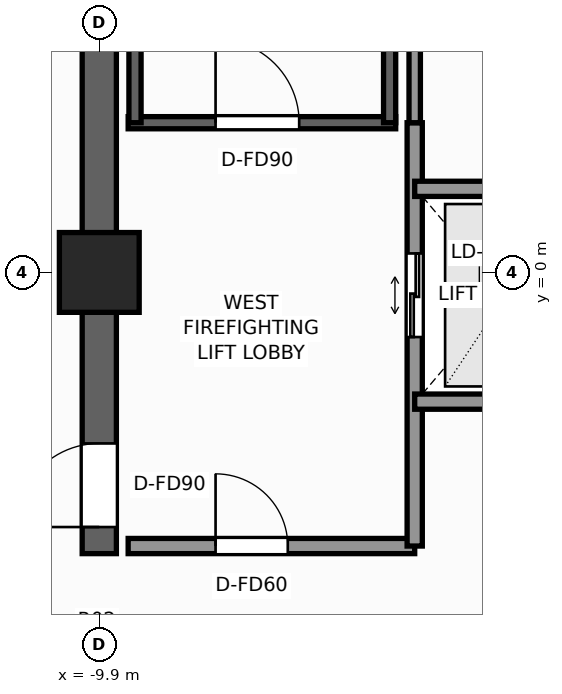
"""IFC4 building model, lengths in metres.
Left out: names, types, materials, properties, quantities, classifications, styles, units other than length and angle.
Written with IfcOpenShell. Run it as: python <this file> out.ifc"""

import sys

from ifc_helpers import new_model, si_unit, direction, frame, frame_2d, origin, origin_2d, place, context, subcontext, project, spatial, rectangle, extrude, element, fill, save


model = new_model("IFC4")
c1 = context("Model", 3, precision=1e-05, world=origin(), true_north=direction((0.0, 1.0)))
c2 = subcontext(c1, "Body", "Model", "MODEL_VIEW")
j1 = project(units=[si_unit("LENGTHUNIT", "METRE"), si_unit("PLANEANGLEUNIT", "RADIAN")], contexts=[c1])
p1 = place(None, origin())
s1 = spatial("IfcSite", under=j1, at=p1, CompositionType="ELEMENT")
p2 = place(p1, origin())
s2 = spatial("IfcBuilding", under=s1, at=p2, CompositionType="ELEMENT")
p3 = place(p2, frame((0.0, 0.0, 254.9)))
s3 = spatial("IfcBuildingStorey", under=s2, at=p3, CompositionType="ELEMENT", Elevation=254.9)
p4 = place(p3, frame((-9.9, -3.7, 0.0), z_axis=(0.0, 0.0, 1.0), x_axis=(0.0, 1.0, 0.0)))
e1 = element("IfcWall", 1, at=p4, inside=s3, PredefinedType="SHEAR", context=c2, shape_type="SweptSolid", body=[
    extrude(rectangle(XDim=13.375, YDim=0.45, at=frame_2d((6.688, 0.0))), origin(), (0.0, 0.0, 1.0), 3.5),
])
p5 = place(p4, frame((0.35, 0.0, 0.0)))
e2 = element("IfcOpeningElement", 2, at=p5, cuts=e1, PredefinedType="OPENING", context=c2, shape_type="SweptSolid", body=[
    extrude(rectangle(XDim=1.1, YDim=2.2, at=frame_2d((0.55, 1.1))), frame((0.0, 0.235, 0.0), z_axis=(0.0, -1.0, 0.0), x_axis=(1.0, 0.0, 0.0)), (0.0, 0.0, 1.0), 0.47),
])
p6 = place(p3, frame((-9.9, 0.0, 0.0), z_axis=(0.0, 0.0, 1.0), x_axis=(1.0, 0.0, 0.0)))
e3 = element("IfcColumn", 3, at=p6, inside=s3, PredefinedType="COLUMN", context=c2, shape_type="SweptSolid", body=[
    extrude(rectangle(XDim=1.05, YDim=1.05, at=origin_2d()), origin(), (0.0, 0.0, 1.0), 3.5),
])
p7 = place(p3, frame((-9.52, 1.97, 0.0), z_axis=(0.0, 0.0, 1.0), x_axis=(1.0, 0.0, 0.0)))
e4 = element("IfcWall", 4, at=p7, inside=s3, PredefinedType="SHEAR", context=c2, shape_type="SweptSolid", body=[
    extrude(rectangle(XDim=3.52, YDim=0.16, at=frame_2d((1.76, 0.0))), origin(), (0.0, 0.0, 1.0), 3.5),
])
p8 = place(p7, frame((1.15, 0.0, 0.0)))
e5 = element("IfcOpeningElement", 5, at=p8, cuts=e4, PredefinedType="OPENING", context=c2, shape_type="SweptSolid", body=[
    extrude(rectangle(XDim=1.1, YDim=2.2, at=frame_2d((0.55, 1.1))), frame((0.0, 0.09, 0.0), z_axis=(0.0, -1.0, 0.0), x_axis=(1.0, 0.0, 0.0)), (0.0, 0.0, 1.0), 0.18),
])
for number, where, z_axis, x_axis in (
    (6, (-9.43, 1.97, 0.0), (0.0, 0.0, 1.0), (0.0, 1.0, 0.0)),
    (7, (-6.08, 1.97, 0.0), (0.0, 0.0, 1.0), (0.0, 1.0, 0.0)),
):
    element("IfcWall", number, at=place(p3, frame(where, z_axis=z_axis, x_axis=x_axis)), inside=s3, PredefinedType="SHEAR", context=c2, shape_type="SweptSolid", body=[
        extrude(rectangle(XDim=7.56, YDim=0.16, at=frame_2d((3.78, 0.0))), origin(), (0.0, 0.0, 1.0), 3.5),
    ])
p9 = place(p3, frame((-9.52, -3.6, 0.0), z_axis=(0.0, 0.0, 1.0), x_axis=(1.0, 0.0, 0.0)))
e8 = element("IfcWall", 8, at=p9, inside=s3, PredefinedType="SOLIDWALL", context=c2, shape_type="SweptSolid", body=[
    extrude(rectangle(XDim=3.77, YDim=0.2, at=frame_2d((1.885, 0.0))), origin(), (0.0, 0.0, 1.0), 3.22),
])
p10 = place(p9, frame((1.15, 0.0, 0.0)))
e9 = element("IfcOpeningElement", 9, at=p10, cuts=e8, PredefinedType="OPENING", context=c2, shape_type="SweptSolid", body=[
    extrude(rectangle(XDim=0.95, YDim=2.06, at=frame_2d((0.475, 1.03))), frame((0.0, 0.11, 0.0), z_axis=(0.0, -1.0, 0.0), x_axis=(1.0, 0.0, 0.0)), (0.0, 0.0, 1.0), 0.22),
])
p11 = place(p3, frame((-5.75, -3.6, 0.0), z_axis=(0.0, 0.0, 1.0), x_axis=(0.0, 1.0, 0.0)))
e10 = element("IfcWall", 10, at=p11, inside=s3, PredefinedType="SOLIDWALL", context=c2, shape_type="SweptSolid", body=[
    extrude(rectangle(XDim=5.57, YDim=0.2, at=frame_2d((2.785, 0.0))), origin(), (0.0, 0.0, 1.0), 3.22),
])
p12 = place(p11, frame((2.75, 0.0, 0.0)))
e11 = element("IfcOpeningElement", 11, at=p12, cuts=e10, PredefinedType="OPENING", context=c2, shape_type="SweptSolid", body=[
    extrude(rectangle(XDim=1.1, YDim=2.2, at=frame_2d((0.55, 1.1))), frame((0.0, 0.11, 0.0), z_axis=(0.0, -1.0, 0.0), x_axis=(1.0, 0.0, 0.0)), (0.0, 0.0, 1.0), 0.22),
])
for number, where, z_axis, x_axis in (
    (12, (-5.75, -1.7, 0.0), (0.0, 0.0, 1.0), (1.0, 0.0, 0.0)),
    (13, (-5.75, 1.1, 0.0), (0.0, 0.0, 1.0), (1.0, 0.0, 0.0)),
):
    element("IfcWall", number, at=place(p3, frame(where, z_axis=z_axis, x_axis=x_axis)), inside=s3, PredefinedType="SOLIDWALL", context=c2, shape_type="SweptSolid", body=[
        extrude(rectangle(XDim=2.4, YDim=0.2, at=frame_2d((1.2, 0.0))), origin(), (0.0, 0.0, 1.0), 3.22),
    ])
p13 = place(p3, frame((-5.75, 1.97, 0.0), z_axis=(0.0, 0.0, 1.0), x_axis=(0.0, 1.0, 0.0)))
e14 = element("IfcWall", 14, at=p13, inside=s3, PredefinedType="PARTITIONING", context=c2, shape_type="SweptSolid", body=[
    extrude(rectangle(XDim=2.33, YDim=0.15, at=frame_2d((1.165, 0.0))), origin(), (0.0, 0.0, 1.0), 3.22),
])
p14 = place(p8, origin())
e15 = element("IfcDoor", 15, at=p14, inside=s3, OperationType="SINGLE_SWING_LEFT", PredefinedType="DOOR", context=c2, shape_type="SweptSolid", body=[
    extrude(rectangle(XDim=1.1, YDim=2.2, at=frame_2d((0.55, 1.1))), frame((0.0, 0.025, 0.0), z_axis=(0.0, -1.0, 0.0), x_axis=(1.0, 0.0, 0.0)), (0.0, 0.0, 1.0), 0.05),
])
fill(e5, e15)
p15 = place(p5, origin())
e16 = element("IfcDoor", 16, at=p15, inside=s3, OperationType="SINGLE_SWING_LEFT", PredefinedType="DOOR", context=c2, shape_type="SweptSolid", body=[
    extrude(rectangle(XDim=1.1, YDim=2.2, at=frame_2d((0.55, 1.1))), frame((0.0, 0.025, 0.0), z_axis=(0.0, -1.0, 0.0), x_axis=(1.0, 0.0, 0.0)), (0.0, 0.0, 1.0), 0.05),
])
fill(e2, e16)
p16 = place(p12, origin())
e17 = element("IfcDoor", 17, at=p16, inside=s3, OperationType="DOUBLE_DOOR_SLIDING", PredefinedType="DOOR", context=c2, shape_type="SweptSolid", body=[
    extrude(rectangle(XDim=1.1, YDim=2.2, at=frame_2d((0.55, 1.1))), frame((0.0, 0.025, 0.0), z_axis=(0.0, -1.0, 0.0), x_axis=(1.0, 0.0, 0.0)), (0.0, 0.0, 1.0), 0.05),
])
fill(e11, e17)
p17 = place(p10, origin())
e18 = element("IfcDoor", 18, at=p17, inside=s3, OperationType="SINGLE_SWING_LEFT", PredefinedType="DOOR", context=c2, shape_type="SweptSolid", body=[
    extrude(rectangle(XDim=0.95, YDim=2.06, at=frame_2d((0.475, 1.03))), frame((0.0, 0.025, 0.0), z_axis=(0.0, -1.0, 0.0), x_axis=(1.0, 0.0, 0.0)), (0.0, 0.0, 1.0), 0.05),
])
fill(e9, e18)
save(model, sys.argv[1])
